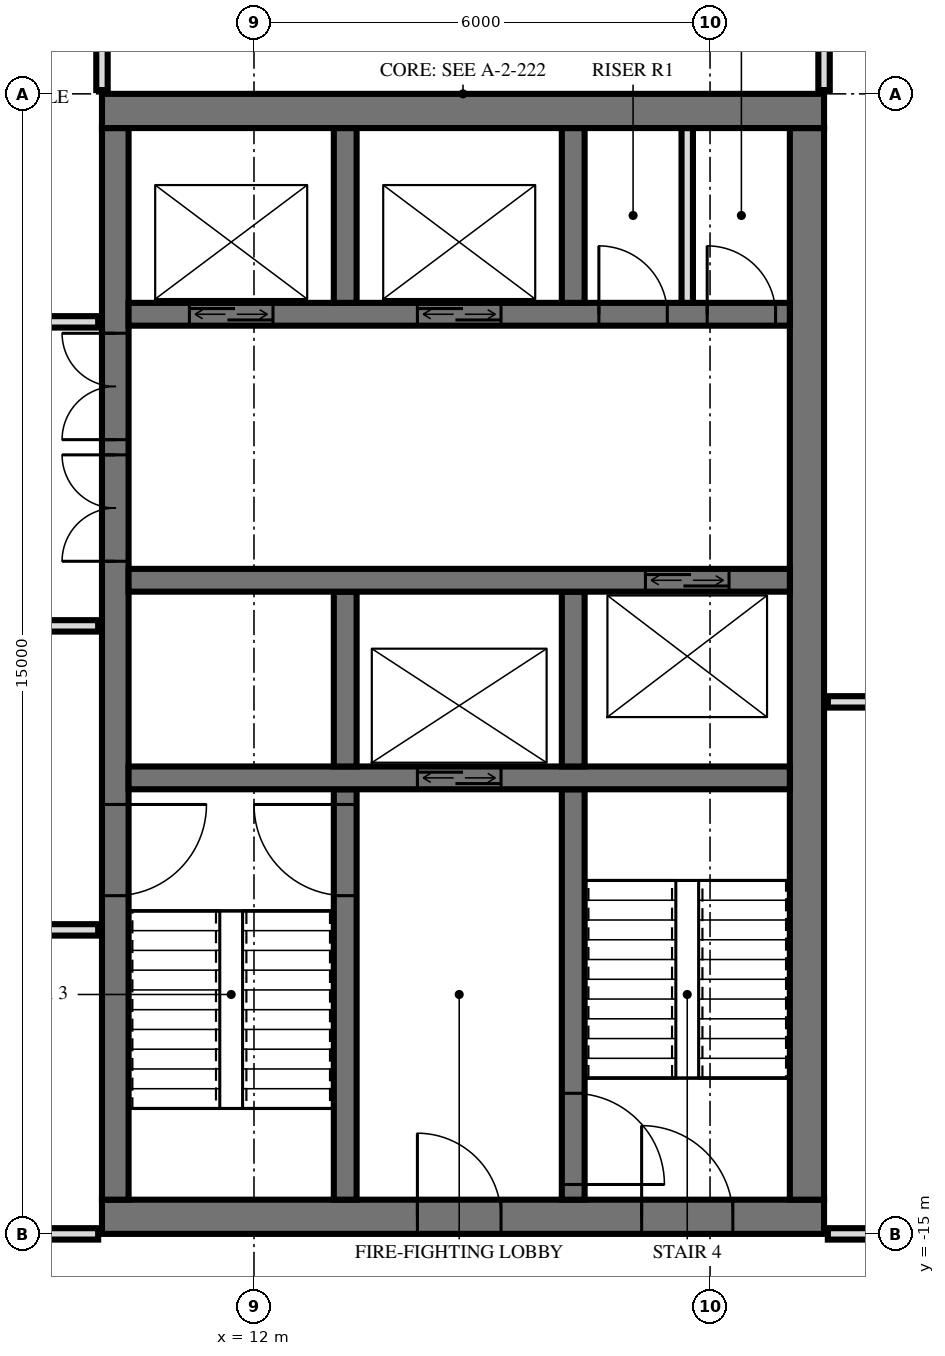
"""IFC4 building model, lengths in metres.
Left out: names, types, materials, properties, quantities, classifications, styles, units other than length and angle.
Written with IfcOpenShell. Run it as: python <this file> out.ifc"""

import sys

from ifc_helpers import new_model, si_unit, direction, frame, frame_2d, origin, place, context, subcontext, project, spatial, rectangle, extrude, element, fill, save


model = new_model("IFC4")
c1 = context("Model", 3, precision=1e-05, world=origin(), true_north=direction((0.0, 1.0)))
c2 = subcontext(c1, "Body", "Model", "MODEL_VIEW")
j1 = project(units=[si_unit("LENGTHUNIT", "METRE"), si_unit("PLANEANGLEUNIT", "RADIAN")], contexts=[c1])
p1 = place(None, origin())
s1 = spatial("IfcSite", under=j1, at=p1, CompositionType="ELEMENT")
p2 = place(p1, origin())
s2 = spatial("IfcBuilding", under=s1, at=p2, CompositionType="ELEMENT")
p3 = place(p2, frame((0.0, 0.0, 330.6)))
s3 = spatial("IfcBuildingStorey", under=s2, at=p3, CompositionType="ELEMENT", Elevation=330.6)
p4 = place(p3, frame((10.0, -0.225, 0.0), z_axis=(0.0, 0.0, 1.0), x_axis=(1.0, 0.0, 0.0)))
e1 = element("IfcWall", 1, at=p4, inside=s3, PredefinedType="SHEAR", context=c2, shape_type="SweptSolid", body=[
    extrude(rectangle(XDim=9.5, YDim=0.45, at=frame_2d((4.75, 0.0))), origin(), (0.0, 0.0, 1.0), 4.0),
])
p5 = place(p3, frame((10.0, -14.775, 0.0), z_axis=(0.0, 0.0, 1.0), x_axis=(1.0, 0.0, 0.0)))
e2 = element("IfcWall", 2, at=p5, inside=s3, PredefinedType="SHEAR", context=c2, shape_type="SweptSolid", body=[
    extrude(rectangle(XDim=9.5, YDim=0.45, at=frame_2d((4.75, 0.0))), origin(), (0.0, 0.0, 1.0), 4.0),
])
p6 = place(p5, frame((7.1, 0.0, 0.0)))
e3 = element("IfcOpeningElement", 3, at=p6, cuts=e2, PredefinedType="OPENING", context=c2, shape_type="SweptSolid", body=[
    extrude(rectangle(XDim=1.2, YDim=2.1, at=frame_2d((0.6, 1.05))), frame((0.0, 0.235, 0.0), z_axis=(0.0, -1.0, 0.0), x_axis=(1.0, 0.0, 0.0)), (0.0, 0.0, 1.0), 0.47),
])
p7 = place(p5, frame((4.15, 0.0, 0.0)))
e4 = element("IfcOpeningElement", 4, at=p7, cuts=e2, PredefinedType="OPENING", context=c2, shape_type="SweptSolid", body=[
    extrude(rectangle(XDim=1.1, YDim=2.1, at=frame_2d((0.55, 1.05))), frame((0.0, 0.235, 0.0), z_axis=(0.0, -1.0, 0.0), x_axis=(1.0, 0.0, 0.0)), (0.0, 0.0, 1.0), 0.47),
])
p8 = place(p3, frame((10.175, -14.55, 0.0), z_axis=(0.0, 0.0, 1.0), x_axis=(0.0, 1.0, 0.0)))
e5 = element("IfcWall", 5, at=p8, inside=s3, PredefinedType="SHEAR", context=c2, shape_type="SweptSolid", body=[
    extrude(rectangle(XDim=14.1, YDim=0.35, at=frame_2d((7.05, 0.0))), origin(), (0.0, 0.0, 1.0), 4.0),
])
p9 = place(p8, frame((8.4, 0.0, 0.0)))
e6 = element("IfcOpeningElement", 6, at=p9, cuts=e5, PredefinedType="OPENING", context=c2, shape_type="SweptSolid", body=[
    extrude(rectangle(XDim=1.4, YDim=2.4, at=frame_2d((0.7, 1.2))), frame((0.0, 0.185, 0.0), z_axis=(0.0, -1.0, 0.0), x_axis=(1.0, 0.0, 0.0)), (0.0, 0.0, 1.0), 0.37),
])
p10 = place(p8, frame((10.0, 0.0, 0.0)))
e7 = element("IfcOpeningElement", 7, at=p10, cuts=e5, PredefinedType="OPENING", context=c2, shape_type="SweptSolid", body=[
    extrude(rectangle(XDim=1.4, YDim=2.4, at=frame_2d((0.7, 1.2))), frame((0.0, 0.185, 0.0), z_axis=(0.0, -1.0, 0.0), x_axis=(1.0, 0.0, 0.0)), (0.0, 0.0, 1.0), 0.37),
])
p11 = place(p8, frame((4.0, 0.0, 0.0)))
e8 = element("IfcOpeningElement", 8, at=p11, cuts=e5, PredefinedType="OPENING", context=c2, shape_type="SweptSolid", body=[
    extrude(rectangle(XDim=1.2, YDim=2.1, at=frame_2d((0.6, 1.05))), frame((0.0, 0.185, 0.0), z_axis=(0.0, -1.0, 0.0), x_axis=(1.0, 0.0, 0.0)), (0.0, 0.0, 1.0), 0.37),
])
p12 = place(p3, frame((19.275, -14.55, 0.0), z_axis=(0.0, 0.0, 1.0), x_axis=(0.0, 1.0, 0.0)))
e9 = element("IfcWall", 9, at=p12, inside=s3, PredefinedType="SHEAR", context=c2, shape_type="SweptSolid", body=[
    extrude(rectangle(XDim=14.1, YDim=0.45, at=frame_2d((7.05, 0.0))), origin(), (0.0, 0.0, 1.0), 4.0),
])
p13 = place(p3, frame((10.35, -2.9, 0.0), z_axis=(0.0, 0.0, 1.0), x_axis=(1.0, 0.0, 0.0)))
e10 = element("IfcWall", 10, at=p13, inside=s3, PredefinedType="SHEAR", context=c2, shape_type="SweptSolid", body=[
    extrude(rectangle(XDim=8.7, YDim=0.3, at=frame_2d((4.35, 0.0))), origin(), (0.0, 0.0, 1.0), 4.0),
])
p14 = place(p13, frame((0.8, 0.0, 0.0)))
e11 = element("IfcOpeningElement", 11, at=p14, cuts=e10, PredefinedType="OPENING", context=c2, shape_type="SweptSolid", body=[
    extrude(rectangle(XDim=1.1, YDim=2.1, at=frame_2d((0.55, 1.05))), frame((0.0, 0.16, 0.0), z_axis=(0.0, -1.0, 0.0), x_axis=(1.0, 0.0, 0.0)), (0.0, 0.0, 1.0), 0.32),
])
p15 = place(p13, frame((3.8, 0.0, 0.0)))
e12 = element("IfcOpeningElement", 12, at=p15, cuts=e10, PredefinedType="OPENING", context=c2, shape_type="SweptSolid", body=[
    extrude(rectangle(XDim=1.1, YDim=2.1, at=frame_2d((0.55, 1.05))), frame((0.0, 0.16, 0.0), z_axis=(0.0, -1.0, 0.0), x_axis=(1.0, 0.0, 0.0)), (0.0, 0.0, 1.0), 0.32),
])
p16 = place(p13, frame((6.188, 0.0, 0.0)))
e13 = element("IfcOpeningElement", 13, at=p16, cuts=e10, PredefinedType="OPENING", context=c2, shape_type="SweptSolid", body=[
    extrude(rectangle(XDim=0.9, YDim=2.1, at=frame_2d((0.45, 1.05))), frame((0.0, 0.16, 0.0), z_axis=(0.0, -1.0, 0.0), x_axis=(1.0, 0.0, 0.0)), (0.0, 0.0, 1.0), 0.32),
])
p17 = place(p13, frame((7.613, 0.0, 0.0)))
e14 = element("IfcOpeningElement", 14, at=p17, cuts=e10, PredefinedType="OPENING", context=c2, shape_type="SweptSolid", body=[
    extrude(rectangle(XDim=0.9, YDim=2.1, at=frame_2d((0.45, 1.05))), frame((0.0, 0.16, 0.0), z_axis=(0.0, -1.0, 0.0), x_axis=(1.0, 0.0, 0.0)), (0.0, 0.0, 1.0), 0.32),
])
p18 = place(p3, frame((10.35, -6.4, 0.0), z_axis=(0.0, 0.0, 1.0), x_axis=(1.0, 0.0, 0.0)))
e15 = element("IfcWall", 15, at=p18, inside=s3, PredefinedType="SHEAR", context=c2, shape_type="SweptSolid", body=[
    extrude(rectangle(XDim=8.7, YDim=0.3, at=frame_2d((4.35, 0.0))), origin(), (0.0, 0.0, 1.0), 4.0),
])
p19 = place(p18, frame((6.8, 0.0, 0.0)))
e16 = element("IfcOpeningElement", 16, at=p19, cuts=e15, PredefinedType="OPENING", context=c2, shape_type="SweptSolid", body=[
    extrude(rectangle(XDim=1.1, YDim=2.1, at=frame_2d((0.55, 1.05))), frame((0.0, 0.16, 0.0), z_axis=(0.0, -1.0, 0.0), x_axis=(1.0, 0.0, 0.0)), (0.0, 0.0, 1.0), 0.32),
])
p20 = place(p3, frame((10.35, -9.0, 0.0), z_axis=(0.0, 0.0, 1.0), x_axis=(1.0, 0.0, 0.0)))
e17 = element("IfcWall", 17, at=p20, inside=s3, PredefinedType="SHEAR", context=c2, shape_type="SweptSolid", body=[
    extrude(rectangle(XDim=8.7, YDim=0.3, at=frame_2d((4.35, 0.0))), origin(), (0.0, 0.0, 1.0), 4.0),
])
p21 = place(p20, frame((3.8, 0.0, 0.0)))
e18 = element("IfcOpeningElement", 18, at=p21, cuts=e17, PredefinedType="OPENING", context=c2, shape_type="SweptSolid", body=[
    extrude(rectangle(XDim=1.1, YDim=2.1, at=frame_2d((0.55, 1.05))), frame((0.0, 0.16, 0.0), z_axis=(0.0, -1.0, 0.0), x_axis=(1.0, 0.0, 0.0)), (0.0, 0.0, 1.0), 0.32),
])
for number, where, z_axis, x_axis in (
    (19, (13.2, -2.75, 0.0), (0.0, 0.0, 1.0), (0.0, 1.0, 0.0)),
    (20, (13.2, -8.85, 0.0), (0.0, 0.0, 1.0), (0.0, 1.0, 0.0)),
):
    element("IfcWall", number, at=place(p3, frame(where, z_axis=z_axis, x_axis=x_axis)), inside=s3, PredefinedType="SHEAR", context=c2, shape_type="SweptSolid", body=[
        extrude(rectangle(XDim=2.3, YDim=0.3, at=frame_2d((1.15, 0.0))), origin(), (0.0, 0.0, 1.0), 4.0),
    ])
p22 = place(p3, frame((13.2, -14.55, 0.0), z_axis=(0.0, 0.0, 1.0), x_axis=(0.0, 1.0, 0.0)))
e21 = element("IfcWall", 21, at=p22, inside=s3, PredefinedType="SHEAR", context=c2, shape_type="SweptSolid", body=[
    extrude(rectangle(XDim=5.4, YDim=0.3, at=frame_2d((2.7, 0.0))), origin(), (0.0, 0.0, 1.0), 4.0),
])
p23 = place(p22, frame((4.0, 0.0, 0.0)))
e22 = element("IfcOpeningElement", 22, at=p23, cuts=e21, PredefinedType="OPENING", context=c2, shape_type="SweptSolid", body=[
    extrude(rectangle(XDim=1.2, YDim=2.1, at=frame_2d((0.6, 1.05))), frame((0.0, 0.16, 0.0), z_axis=(0.0, -1.0, 0.0), x_axis=(1.0, 0.0, 0.0)), (0.0, 0.0, 1.0), 0.32),
])
for number, where, z_axis, x_axis in (
    (23, (16.2, -2.75, 0.0), (0.0, 0.0, 1.0), (0.0, 1.0, 0.0)),
    (24, (16.2, -8.85, 0.0), (0.0, 0.0, 1.0), (0.0, 1.0, 0.0)),
):
    element("IfcWall", number, at=place(p3, frame(where, z_axis=z_axis, x_axis=x_axis)), inside=s3, PredefinedType="SHEAR", context=c2, shape_type="SweptSolid", body=[
        extrude(rectangle(XDim=2.3, YDim=0.3, at=frame_2d((1.15, 0.0))), origin(), (0.0, 0.0, 1.0), 4.0),
    ])
p24 = place(p3, frame((16.2, -14.55, 0.0), z_axis=(0.0, 0.0, 1.0), x_axis=(0.0, 1.0, 0.0)))
e25 = element("IfcWall", 25, at=p24, inside=s3, PredefinedType="SHEAR", context=c2, shape_type="SweptSolid", body=[
    extrude(rectangle(XDim=5.4, YDim=0.3, at=frame_2d((2.7, 0.0))), origin(), (0.0, 0.0, 1.0), 4.0),
])
p25 = place(p24, frame((0.2, 0.0, 0.0)))
e26 = element("IfcOpeningElement", 26, at=p25, cuts=e25, PredefinedType="OPENING", context=c2, shape_type="SweptSolid", body=[
    extrude(rectangle(XDim=1.2, YDim=2.1, at=frame_2d((0.6, 1.05))), frame((0.0, 0.16, 0.0), z_axis=(0.0, -1.0, 0.0), x_axis=(1.0, 0.0, 0.0)), (0.0, 0.0, 1.0), 0.32),
])
p26 = place(p3, frame((17.7, -2.75, 0.0), z_axis=(0.0, 0.0, 1.0), x_axis=(0.0, 1.0, 0.0)))
e27 = element("IfcWall", 27, at=p26, inside=s3, PredefinedType="PARTITIONING", context=c2, shape_type="SweptSolid", body=[
    extrude(rectangle(XDim=2.3, YDim=0.15, at=frame_2d((1.15, 0.0))), origin(), (0.0, 0.0, 1.0), 3.7),
])
p27 = place(p3, frame((19.5, 0.05, 0.0), z_axis=(0.0, 0.0, 1.0), x_axis=(0.0, 1.0, 0.0)))
e28 = element("IfcWall", 28, at=p27, inside=s3, PredefinedType="PARTITIONING", context=c2, shape_type="SweptSolid", body=[
    extrude(rectangle(XDim=4.403, YDim=0.15, at=frame_2d((2.202, 0.0))), origin(), (0.0, 0.0, 1.0), 3.72),
])
p28 = place(p3, frame((10.0, 0.05, 0.0), z_axis=(0.0, 0.0, 1.0), x_axis=(0.0, 1.0, 0.0)))
e29 = element("IfcWall", 29, at=p28, inside=s3, PredefinedType="PLUMBINGWALL", context=c2, shape_type="SweptSolid", body=[
    extrude(rectangle(XDim=4.702, YDim=0.15, at=frame_2d((2.351, 0.0))), origin(), (0.0, 0.0, 1.0), 3.72),
])
p29 = place(p3, frame((-3.506, -15.0, 0.0), z_axis=(0.0, 0.0, 1.0), x_axis=(1.0, 0.0, 0.0)))
e30 = element("IfcWall", 30, at=p29, inside=s3, PredefinedType="PARTITIONING", context=c2, shape_type="SweptSolid", body=[
    extrude(rectangle(XDim=13.456, YDim=0.15, at=frame_2d((6.728, 0.0))), origin(), (0.0, 0.0, 1.0), 3.084),
])
p30 = place(p29, frame((6.253, 0.0, 0.0)))
e31 = element("IfcOpeningElement", 31, at=p30, cuts=e30, PredefinedType="OPENING", context=c2, shape_type="SweptSolid", body=[
    extrude(rectangle(XDim=1.0, YDim=2.1, at=frame_2d((0.5, 1.05))), frame((0.0, 0.085, 0.0), z_axis=(0.0, -1.0, 0.0), x_axis=(1.0, 0.0, 0.0)), (0.0, 0.0, 1.0), 0.17),
])
p31 = place(p3, frame((19.55, -15.0, 0.0), z_axis=(0.0, 0.0, 1.0), x_axis=(1.0, 0.0, 0.0)))
e32 = element("IfcWall", 32, at=p31, inside=s3, PredefinedType="PARTITIONING", context=c2, shape_type="SweptSolid", body=[
    extrude(rectangle(XDim=3.49, YDim=0.15, at=frame_2d((1.745, 0.0))), origin(), (0.0, 0.0, 1.0), 3.72),
])
p32 = place(p31, frame((1.311, 0.0, 0.0)))
e33 = element("IfcOpeningElement", 33, at=p32, cuts=e32, PredefinedType="OPENING", context=c2, shape_type="SweptSolid", body=[
    extrude(rectangle(XDim=1.0, YDim=2.1, at=frame_2d((0.5, 1.05))), frame((0.0, 0.085, 0.0), z_axis=(0.0, -1.0, 0.0), x_axis=(1.0, 0.0, 0.0)), (0.0, 0.0, 1.0), 0.17),
])
p33 = place(p3, frame((-9.95, -11.0, 0.0), z_axis=(0.0, 0.0, 1.0), x_axis=(1.0, 0.0, 0.0)))
e34 = element("IfcWall", 34, at=p33, inside=s3, PredefinedType="PARTITIONING", context=c2, shape_type="SweptSolid", body=[
    extrude(rectangle(XDim=19.9, YDim=0.15, at=frame_2d((9.95, 0.0))), origin(), (0.0, 0.0, 1.0), 3.72),
])
p34 = place(p33, frame((9.45, 0.0, 0.0)))
e35 = element("IfcOpeningElement", 35, at=p34, cuts=e34, PredefinedType="OPENING", context=c2, shape_type="SweptSolid", body=[
    extrude(rectangle(XDim=1.0, YDim=2.1, at=frame_2d((0.5, 1.05))), frame((0.0, 0.085, 0.0), z_axis=(0.0, -1.0, 0.0), x_axis=(1.0, 0.0, 0.0)), (0.0, 0.0, 1.0), 0.17),
])
p35 = place(p33, frame((2.2, 0.0, 0.0)))
e36 = element("IfcOpeningElement", 36, at=p35, cuts=e34, PredefinedType="OPENING", context=c2, shape_type="SweptSolid", body=[
    extrude(rectangle(XDim=1.0, YDim=2.1, at=frame_2d((0.5, 1.05))), frame((0.0, 0.085, 0.0), z_axis=(0.0, -1.0, 0.0), x_axis=(1.0, 0.0, 0.0)), (0.0, 0.0, 1.0), 0.17),
])
p36 = place(p3, frame((19.55, -8.0, 0.0), z_axis=(0.0, 0.0, 1.0), x_axis=(1.0, 0.0, 0.0)))
e37 = element("IfcWall", 37, at=p36, inside=s3, PredefinedType="PARTITIONING", context=c2, shape_type="SweptSolid", body=[
    extrude(rectangle(XDim=2.631, YDim=0.15, at=frame_2d((1.315, 0.0))), origin(), (0.0, 0.0, 1.0), 3.253),
])
p37 = place(p36, frame((0.931, 0.0, 0.0)))
e38 = element("IfcOpeningElement", 38, at=p37, cuts=e37, PredefinedType="OPENING", context=c2, shape_type="SweptSolid", body=[
    extrude(rectangle(XDim=0.9, YDim=2.1, at=frame_2d((0.45, 1.05))), frame((0.0, 0.085, 0.0), z_axis=(0.0, -1.0, 0.0), x_axis=(1.0, 0.0, 0.0)), (0.0, 0.0, 1.0), 0.17),
])
p38 = place(p3, frame((-9.95, -7.0, 0.0), z_axis=(0.0, 0.0, 1.0), x_axis=(1.0, 0.0, 0.0)))
e39 = element("IfcWall", 39, at=p38, inside=s3, PredefinedType="PARTITIONING", context=c2, shape_type="SweptSolid", body=[
    extrude(rectangle(XDim=19.9, YDim=0.15, at=frame_2d((9.95, 0.0))), origin(), (0.0, 0.0, 1.0), 3.72),
])
p39 = place(p38, frame((9.45, 0.0, 0.0)))
e40 = element("IfcOpeningElement", 40, at=p39, cuts=e39, PredefinedType="OPENING", context=c2, shape_type="SweptSolid", body=[
    extrude(rectangle(XDim=1.0, YDim=2.1, at=frame_2d((0.5, 1.05))), frame((0.0, 0.085, 0.0), z_axis=(0.0, -1.0, 0.0), x_axis=(1.0, 0.0, 0.0)), (0.0, 0.0, 1.0), 0.17),
])
p40 = place(p38, frame((16.7, 0.0, 0.0)))
e41 = element("IfcOpeningElement", 41, at=p40, cuts=e39, PredefinedType="OPENING", context=c2, shape_type="SweptSolid", body=[
    extrude(rectangle(XDim=1.0, YDim=2.1, at=frame_2d((0.5, 1.05))), frame((0.0, 0.085, 0.0), z_axis=(0.0, -1.0, 0.0), x_axis=(1.0, 0.0, 0.0)), (0.0, 0.0, 1.0), 0.17),
])
p41 = place(p3, frame((-9.95, -3.0, 0.0), z_axis=(0.0, 0.0, 1.0), x_axis=(1.0, 0.0, 0.0)))
e42 = element("IfcWall", 42, at=p41, inside=s3, PredefinedType="PARTITIONING", context=c2, shape_type="SweptSolid", body=[
    extrude(rectangle(XDim=19.9, YDim=0.15, at=frame_2d((9.95, 0.0))), origin(), (0.0, 0.0, 1.0), 3.72),
])
p42 = place(p41, frame((2.2, 0.0, 0.0)))
e43 = element("IfcOpeningElement", 43, at=p42, cuts=e42, PredefinedType="OPENING", context=c2, shape_type="SweptSolid", body=[
    extrude(rectangle(XDim=1.0, YDim=2.1, at=frame_2d((0.5, 1.05))), frame((0.0, 0.085, 0.0), z_axis=(0.0, -1.0, 0.0), x_axis=(1.0, 0.0, 0.0)), (0.0, 0.0, 1.0), 0.17),
])
p43 = place(p41, frame((7.2, 0.0, 0.0)))
e44 = element("IfcOpeningElement", 44, at=p43, cuts=e42, PredefinedType="OPENING", context=c2, shape_type="SweptSolid", body=[
    extrude(rectangle(XDim=1.0, YDim=2.1, at=frame_2d((0.5, 1.05))), frame((0.0, 0.085, 0.0), z_axis=(0.0, -1.0, 0.0), x_axis=(1.0, 0.0, 0.0)), (0.0, 0.0, 1.0), 0.17),
])
p44 = place(p41, frame((11.7, 0.0, 0.0)))
e45 = element("IfcOpeningElement", 45, at=p44, cuts=e42, PredefinedType="OPENING", context=c2, shape_type="SweptSolid", body=[
    extrude(rectangle(XDim=1.0, YDim=2.1, at=frame_2d((0.5, 1.05))), frame((0.0, 0.085, 0.0), z_axis=(0.0, -1.0, 0.0), x_axis=(1.0, 0.0, 0.0)), (0.0, 0.0, 1.0), 0.17),
])
p45 = place(p41, frame((15.45, 0.0, 0.0)))
e46 = element("IfcOpeningElement", 46, at=p45, cuts=e42, PredefinedType="OPENING", context=c2, shape_type="SweptSolid", body=[
    extrude(rectangle(XDim=1.0, YDim=2.1, at=frame_2d((0.5, 1.05))), frame((0.0, 0.085, 0.0), z_axis=(0.0, -1.0, 0.0), x_axis=(1.0, 0.0, 0.0)), (0.0, 0.0, 1.0), 0.17),
])
p46 = place(p41, frame((18.2, 0.0, 0.0)))
e47 = element("IfcOpeningElement", 47, at=p46, cuts=e42, PredefinedType="OPENING", context=c2, shape_type="SweptSolid", body=[
    extrude(rectangle(XDim=1.0, YDim=2.1, at=frame_2d((0.5, 1.05))), frame((0.0, 0.085, 0.0), z_axis=(0.0, -1.0, 0.0), x_axis=(1.0, 0.0, 0.0)), (0.0, 0.0, 1.0), 0.17),
])
p47 = place(p14, origin())
e48 = element("IfcDoor", 48, at=p47, inside=s3, OperationType="DOUBLE_DOOR_SLIDING", PredefinedType="USERDEFINED", context=c2, shape_type="SweptSolid", body=[
    extrude(rectangle(XDim=1.1, YDim=2.1, at=frame_2d((0.55, 1.05))), frame((0.0, 0.025, 0.0), z_axis=(0.0, -1.0, 0.0), x_axis=(1.0, 0.0, 0.0)), (0.0, 0.0, 1.0), 0.05),
])
fill(e11, e48)
p48 = place(p15, origin())
e49 = element("IfcDoor", 49, at=p48, inside=s3, OperationType="DOUBLE_DOOR_SLIDING", PredefinedType="USERDEFINED", context=c2, shape_type="SweptSolid", body=[
    extrude(rectangle(XDim=1.1, YDim=2.1, at=frame_2d((0.55, 1.05))), frame((0.0, 0.025, 0.0), z_axis=(0.0, -1.0, 0.0), x_axis=(1.0, 0.0, 0.0)), (0.0, 0.0, 1.0), 0.05),
])
fill(e12, e49)
p49 = place(p21, origin())
e50 = element("IfcDoor", 50, at=p49, inside=s3, OperationType="DOUBLE_DOOR_SLIDING", PredefinedType="USERDEFINED", context=c2, shape_type="SweptSolid", body=[
    extrude(rectangle(XDim=1.1, YDim=2.1, at=frame_2d((0.55, 1.05))), frame((0.0, 0.025, 0.0), z_axis=(0.0, -1.0, 0.0), x_axis=(1.0, 0.0, 0.0)), (0.0, 0.0, 1.0), 0.05),
])
fill(e18, e50)
p50 = place(p19, origin())
e51 = element("IfcDoor", 51, at=p50, inside=s3, OperationType="DOUBLE_DOOR_SLIDING", PredefinedType="USERDEFINED", context=c2, shape_type="SweptSolid", body=[
    extrude(rectangle(XDim=1.1, YDim=2.1, at=frame_2d((0.55, 1.05))), frame((0.0, 0.025, 0.0), z_axis=(0.0, -1.0, 0.0), x_axis=(1.0, 0.0, 0.0)), (0.0, 0.0, 1.0), 0.05),
])
fill(e16, e51)
p51 = place(p9, origin())
e52 = element("IfcDoor", 52, at=p51, inside=s3, OperationType="DOUBLE_DOOR_SINGLE_SWING", PredefinedType="DOOR", context=c2, shape_type="SweptSolid", body=[
    extrude(rectangle(XDim=1.4, YDim=2.4, at=frame_2d((0.7, 1.2))), frame((0.0, 0.025, 0.0), z_axis=(0.0, -1.0, 0.0), x_axis=(1.0, 0.0, 0.0)), (0.0, 0.0, 1.0), 0.05),
])
fill(e6, e52)
p52 = place(p10, origin())
e53 = element("IfcDoor", 53, at=p52, inside=s3, OperationType="DOUBLE_DOOR_SINGLE_SWING", PredefinedType="DOOR", context=c2, shape_type="SweptSolid", body=[
    extrude(rectangle(XDim=1.4, YDim=2.4, at=frame_2d((0.7, 1.2))), frame((0.0, 0.025, 0.0), z_axis=(0.0, -1.0, 0.0), x_axis=(1.0, 0.0, 0.0)), (0.0, 0.0, 1.0), 0.05),
])
fill(e7, e53)
p53 = place(p11, frame((0.6, 0.0, 0.0), z_axis=(0.0, 0.0, 1.0), x_axis=(-1.0, 0.0, 0.0)))
e54 = element("IfcDoor", 54, at=p53, inside=s3, OperationType="SINGLE_SWING_RIGHT", PredefinedType="DOOR", context=c2, shape_type="SweptSolid", body=[
    extrude(rectangle(XDim=1.2, YDim=2.1, at=frame_2d((0.0, 1.05))), frame((0.0, -0.025, 0.0), z_axis=(0.0, 1.0, 0.0), x_axis=(-1.0, 0.0, 0.0)), (0.0, 0.0, 1.0), 0.05),
])
fill(e8, e54)
p54 = place(p6, origin())
e55 = element("IfcDoor", 55, at=p54, inside=s3, OperationType="SINGLE_SWING_RIGHT", PredefinedType="DOOR", context=c2, shape_type="SweptSolid", body=[
    extrude(rectangle(XDim=1.2, YDim=2.1, at=frame_2d((0.6, 1.05))), frame((0.0, 0.025, 0.0), z_axis=(0.0, -1.0, 0.0), x_axis=(1.0, 0.0, 0.0)), (0.0, 0.0, 1.0), 0.05),
])
fill(e3, e55)
p55 = place(p7, origin())
e56 = element("IfcDoor", 56, at=p55, inside=s3, OperationType="SINGLE_SWING_RIGHT", PredefinedType="DOOR", context=c2, shape_type="SweptSolid", body=[
    extrude(rectangle(XDim=1.1, YDim=2.1, at=frame_2d((0.55, 1.05))), frame((0.0, 0.025, 0.0), z_axis=(0.0, -1.0, 0.0), x_axis=(1.0, 0.0, 0.0)), (0.0, 0.0, 1.0), 0.05),
])
fill(e4, e56)
p56 = place(p16, origin())
e57 = element("IfcDoor", 57, at=p56, inside=s3, OperationType="SINGLE_SWING_RIGHT", PredefinedType="DOOR", context=c2, shape_type="SweptSolid", body=[
    extrude(rectangle(XDim=0.9, YDim=2.1, at=frame_2d((0.45, 1.05))), frame((0.0, 0.025, 0.0), z_axis=(0.0, -1.0, 0.0), x_axis=(1.0, 0.0, 0.0)), (0.0, 0.0, 1.0), 0.05),
])
fill(e13, e57)
p57 = place(p17, origin())
e58 = element("IfcDoor", 58, at=p57, inside=s3, OperationType="SINGLE_SWING_RIGHT", PredefinedType="DOOR", context=c2, shape_type="SweptSolid", body=[
    extrude(rectangle(XDim=0.9, YDim=2.1, at=frame_2d((0.45, 1.05))), frame((0.0, 0.025, 0.0), z_axis=(0.0, -1.0, 0.0), x_axis=(1.0, 0.0, 0.0)), (0.0, 0.0, 1.0), 0.05),
])
fill(e14, e58)
p58 = place(p23, origin())
e59 = element("IfcDoor", 59, at=p58, inside=s3, OperationType="SINGLE_SWING_LEFT", PredefinedType="DOOR", context=c2, shape_type="SweptSolid", body=[
    extrude(rectangle(XDim=1.2, YDim=2.1, at=frame_2d((0.6, 1.05))), frame((0.0, 0.025, 0.0), z_axis=(0.0, -1.0, 0.0), x_axis=(1.0, 0.0, 0.0)), (0.0, 0.0, 1.0), 0.05),
])
fill(e22, e59)
p59 = place(p25, frame((0.6, 0.0, 0.0), z_axis=(0.0, 0.0, 1.0), x_axis=(-1.0, 0.0, 0.0)))
e60 = element("IfcDoor", 60, at=p59, inside=s3, OperationType="SINGLE_SWING_LEFT", PredefinedType="DOOR", context=c2, shape_type="SweptSolid", body=[
    extrude(rectangle(XDim=1.2, YDim=2.1, at=frame_2d((0.0, 1.05))), frame((0.0, -0.025, 0.0), z_axis=(0.0, 1.0, 0.0), x_axis=(-1.0, 0.0, 0.0)), (0.0, 0.0, 1.0), 0.05),
])
fill(e26, e60)
save(model, sys.argv[1])
